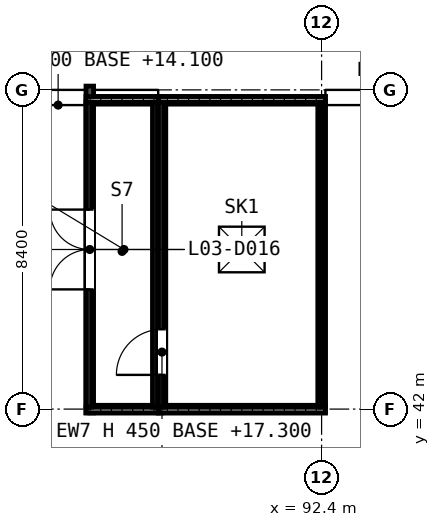
"""IFC4 building model, lengths in metres.
Left out: names, types, materials, properties, quantities, classifications, styles, units other than length and angle.
Written with IfcOpenShell. Run it as: python <this file> out.ifc"""

import sys

from ifc_helpers import new_model, si_unit, direction, frame, frame_2d, origin, origin_2d, place, context, subcontext, project, spatial, rectangle, extrude, element, fill, save


model = new_model("IFC4")
c1 = context("Model", 3, precision=1e-05, world=origin(), true_north=direction((0.0, 1.0)))
c2 = subcontext(c1, "Body", "Model", "MODEL_VIEW")
j1 = project(units=[si_unit("LENGTHUNIT", "METRE"), si_unit("PLANEANGLEUNIT", "RADIAN")], contexts=[c1])
p1 = place(None, origin())
s1 = spatial("IfcSite", under=j1, at=p1, CompositionType="ELEMENT")
p2 = place(p1, origin())
s2 = spatial("IfcBuilding", under=s1, at=p2, CompositionType="ELEMENT")
p3 = place(p2, frame((0.0, 0.0, 14.4)))
s3 = spatial("IfcBuildingStorey", under=s2, at=p3, CompositionType="ELEMENT", Elevation=14.4)
for number, where, z_axis, x_axis in (
    (1, (88.1, 42.0, -0.3), (0.0, 0.0, 1.0), (1.0, 0.0, 0.0)),
    (2, (88.1, 50.125, -0.3), (0.0, 0.0, 1.0), (1.0, 0.0, 0.0)),
):
    element("IfcWall", number, at=place(p3, frame(where, z_axis=z_axis, x_axis=x_axis)), inside=s3, PredefinedType="SHEAR", context=c2, shape_type="SweptSolid", body=[
        extrude(rectangle(XDim=4.4, YDim=0.2, at=frame_2d((2.2, 0.0))), origin(), (0.0, 0.0, 1.0), 3.0),
    ])
p4 = place(p3, frame((88.2, 42.1, -0.3), z_axis=(0.0, 0.0, 1.0), x_axis=(0.0, 1.0, 0.0)))
e3 = element("IfcWall", 3, at=p4, inside=s3, PredefinedType="SHEAR", context=c2, shape_type="SweptSolid", body=[
    extrude(rectangle(XDim=7.925, YDim=0.2, at=frame_2d((3.962, 0.0))), origin(), (0.0, 0.0, 1.0), 3.0),
])
p5 = place(p4, frame((0.8, 0.0, 0.3)))
e4 = element("IfcOpeningElement", 4, at=p5, cuts=e3, PredefinedType="OPENING", context=c2, shape_type="SweptSolid", body=[
    extrude(rectangle(XDim=1.2, YDim=2.2, at=frame_2d((0.6, 1.1))), frame((0.0, 0.11, 0.0), z_axis=(0.0, -1.0, 0.0), x_axis=(1.0, 0.0, 0.0)), (0.0, 0.0, 1.0), 0.22),
])
p6 = place(p3, frame((92.4, 42.1, -0.3), z_axis=(0.0, 0.0, 1.0), x_axis=(0.0, 1.0, 0.0)))
e5 = element("IfcWall", 5, at=p6, inside=s3, PredefinedType="SHEAR", context=c2, shape_type="SweptSolid", body=[
    extrude(rectangle(XDim=7.925, YDim=0.2, at=frame_2d((3.962, 0.0))), origin(), (0.0, 0.0, 1.0), 3.0),
])
for number, where, z_axis, x_axis in (
    (6, (88.2, 42.0, -0.3), (0.0, 0.0, 1.0), (-1.0, 0.0, 0.0)),
    (7, (88.2, 50.125, -0.3), (0.0, 0.0, 1.0), (-1.0, 0.0, 0.0)),
):
    element("IfcWall", number, at=place(p3, frame(where, z_axis=z_axis, x_axis=x_axis)), inside=s3, PredefinedType="SHEAR", context=c2, shape_type="SweptSolid", body=[
        extrude(rectangle(XDim=1.9, YDim=0.2, at=frame_2d((0.95, 0.0))), origin(), (0.0, 0.0, 1.0), 3.0),
    ])
p7 = place(p3, frame((86.3, 41.9, -0.3), z_axis=(0.0, 0.0, 1.0), x_axis=(0.0, 1.0, 0.0)))
e8 = element("IfcWall", 8, at=p7, inside=s3, PredefinedType="SHEAR", context=c2, shape_type="SweptSolid", body=[
    extrude(rectangle(XDim=8.6, YDim=0.2, at=frame_2d((4.3, 0.0))), origin(), (0.0, 0.0, 1.0), 3.0),
])
p8 = place(p7, frame((3.25, 0.0, 0.3)))
e9 = element("IfcOpeningElement", 9, at=p8, cuts=e8, PredefinedType="OPENING", context=c2, shape_type="SweptSolid", body=[
    extrude(rectangle(XDim=2.1, YDim=2.2, at=frame_2d((1.05, 1.1))), frame((0.0, 0.11, 0.0), z_axis=(0.0, -1.0, 0.0), x_axis=(1.0, 0.0, 0.0)), (0.0, 0.0, 1.0), 0.22),
])
for number, where, z_axis, x_axis in (
    (10, (88.1, 41.975, 2.9), (0.0, 0.0, 1.0), (1.0, 0.0, 0.0)),
    (11, (88.1, 50.15, 2.9), (0.0, 0.0, 1.0), (1.0, 0.0, 0.0)),
):
    element("IfcWall", number, at=place(p3, frame(where, z_axis=z_axis, x_axis=x_axis)), inside=s3, PredefinedType="PARAPET", context=c2, shape_type="SweptSolid", body=[
        extrude(rectangle(XDim=4.4, YDim=0.15, at=frame_2d((2.2, 0.0))), origin(), (0.0, 0.0, 1.0), 0.45),
    ])
for number, where, z_axis, x_axis in (
    (12, (88.175, 42.05, 2.9), (0.0, 0.0, 1.0), (0.0, 1.0, 0.0)),
    (13, (92.425, 42.05, 2.9), (0.0, 0.0, 1.0), (0.0, 1.0, 0.0)),
):
    element("IfcWall", number, at=place(p3, frame(where, z_axis=z_axis, x_axis=x_axis)), inside=s3, PredefinedType="PARAPET", context=c2, shape_type="SweptSolid", body=[
        extrude(rectangle(XDim=8.025, YDim=0.15, at=frame_2d((4.012, 0.0))), origin(), (0.0, 0.0, 1.0), 0.45),
    ])
for number, where, z_axis, x_axis in (
    (14, (86.2, 41.975, 2.9), (0.0, 0.0, 1.0), (1.0, 0.0, 0.0)),
    (15, (86.2, 50.15, 2.9), (0.0, 0.0, 1.0), (1.0, 0.0, 0.0)),
):
    element("IfcWall", number, at=place(p3, frame(where, z_axis=z_axis, x_axis=x_axis)), inside=s3, PredefinedType="PARAPET", context=c2, shape_type="SweptSolid", body=[
        extrude(rectangle(XDim=1.9, YDim=0.15, at=frame_2d((0.95, 0.0))), origin(), (0.0, 0.0, 1.0), 0.45),
    ])
for number, where, z_axis, x_axis in (
    (16, (86.275, 42.05, 2.9), (0.0, 0.0, 1.0), (0.0, 1.0, 0.0)),
    (17, (88.025, 42.05, 2.9), (0.0, 0.0, 1.0), (0.0, 1.0, 0.0)),
):
    element("IfcWall", number, at=place(p3, frame(where, z_axis=z_axis, x_axis=x_axis)), inside=s3, PredefinedType="PARAPET", context=c2, shape_type="SweptSolid", body=[
        extrude(rectangle(XDim=8.025, YDim=0.15, at=frame_2d((4.012, 0.0))), origin(), (0.0, 0.0, 1.0), 0.45),
    ])
p9 = place(p8, origin())
e18 = element("IfcDoor", 18, at=p9, inside=s3, OperationType="DOUBLE_DOOR_SINGLE_SWING", PredefinedType="DOOR", context=c2, shape_type="SweptSolid", body=[
    extrude(rectangle(XDim=2.1, YDim=0.013, at=frame_2d((1.05, 0.007))), frame((0.0, 0.088, 0.0), z_axis=(0.0, -1.0, 0.0), x_axis=(1.0, 0.0, 0.0)), (0.0, 0.0, 1.0), 0.176),
    extrude(rectangle(XDim=0.075, YDim=2.112, at=frame_2d((0.038, 1.069))), frame((0.0, 0.098, 0.0), z_axis=(0.0, -1.0, 0.0), x_axis=(1.0, 0.0, 0.0)), (0.0, 0.0, 1.0), 0.196),
    extrude(rectangle(XDim=0.075, YDim=2.112, at=frame_2d((2.062, 1.069))), frame((0.0, 0.098, 0.0), z_axis=(0.0, -1.0, 0.0), x_axis=(1.0, 0.0, 0.0)), (0.0, 0.0, 1.0), 0.196),
    extrude(rectangle(XDim=2.1, YDim=0.075, at=frame_2d((1.05, 2.163))), frame((0.0, 0.088, 0.0), z_axis=(0.0, -1.0, 0.0), x_axis=(1.0, 0.0, 0.0)), (0.0, 0.0, 1.0), 0.176),
    extrude(rectangle(XDim=1.95, YDim=2.112, at=frame_2d((1.05, 1.069))), frame((0.0, 0.025, 0.0), z_axis=(0.0, -1.0, 0.0), x_axis=(1.0, 0.0, 0.0)), (0.0, 0.0, 1.0), 0.05),
])
fill(e9, e18)
p10 = place(p5, origin())
e19 = element("IfcDoor", 19, at=p10, inside=s3, OperationType="SINGLE_SWING_RIGHT", PredefinedType="DOOR", context=c2, shape_type="SweptSolid", body=[
    extrude(rectangle(XDim=1.2, YDim=2.2, at=frame_2d((0.6, 1.1))), frame((0.0, 0.025, 0.0), z_axis=(0.0, -1.0, 0.0), x_axis=(1.0, 0.0, 0.0)), (0.0, 0.0, 1.0), 0.05),
])
fill(e4, e19)
p11 = place(p3, frame((0.0, 0.0, 2.7)))
p12 = place(p11, frame((90.3, 46.2, 0.0)))
p13 = place(p12, frame((0.0, 0.0, 0.15)))
e20 = element("IfcWindow", 20, at=p13, inside=s3, PartitioningType="SINGLE_PANEL", PredefinedType="SKYLIGHT", context=c2, shape_type="SweptSolid", body=[
    extrude(rectangle(XDim=1.2, YDim=1.2, at=origin_2d()), origin(), (0.0, 0.0, 1.0), 0.05),
])
save(model, sys.argv[1])
